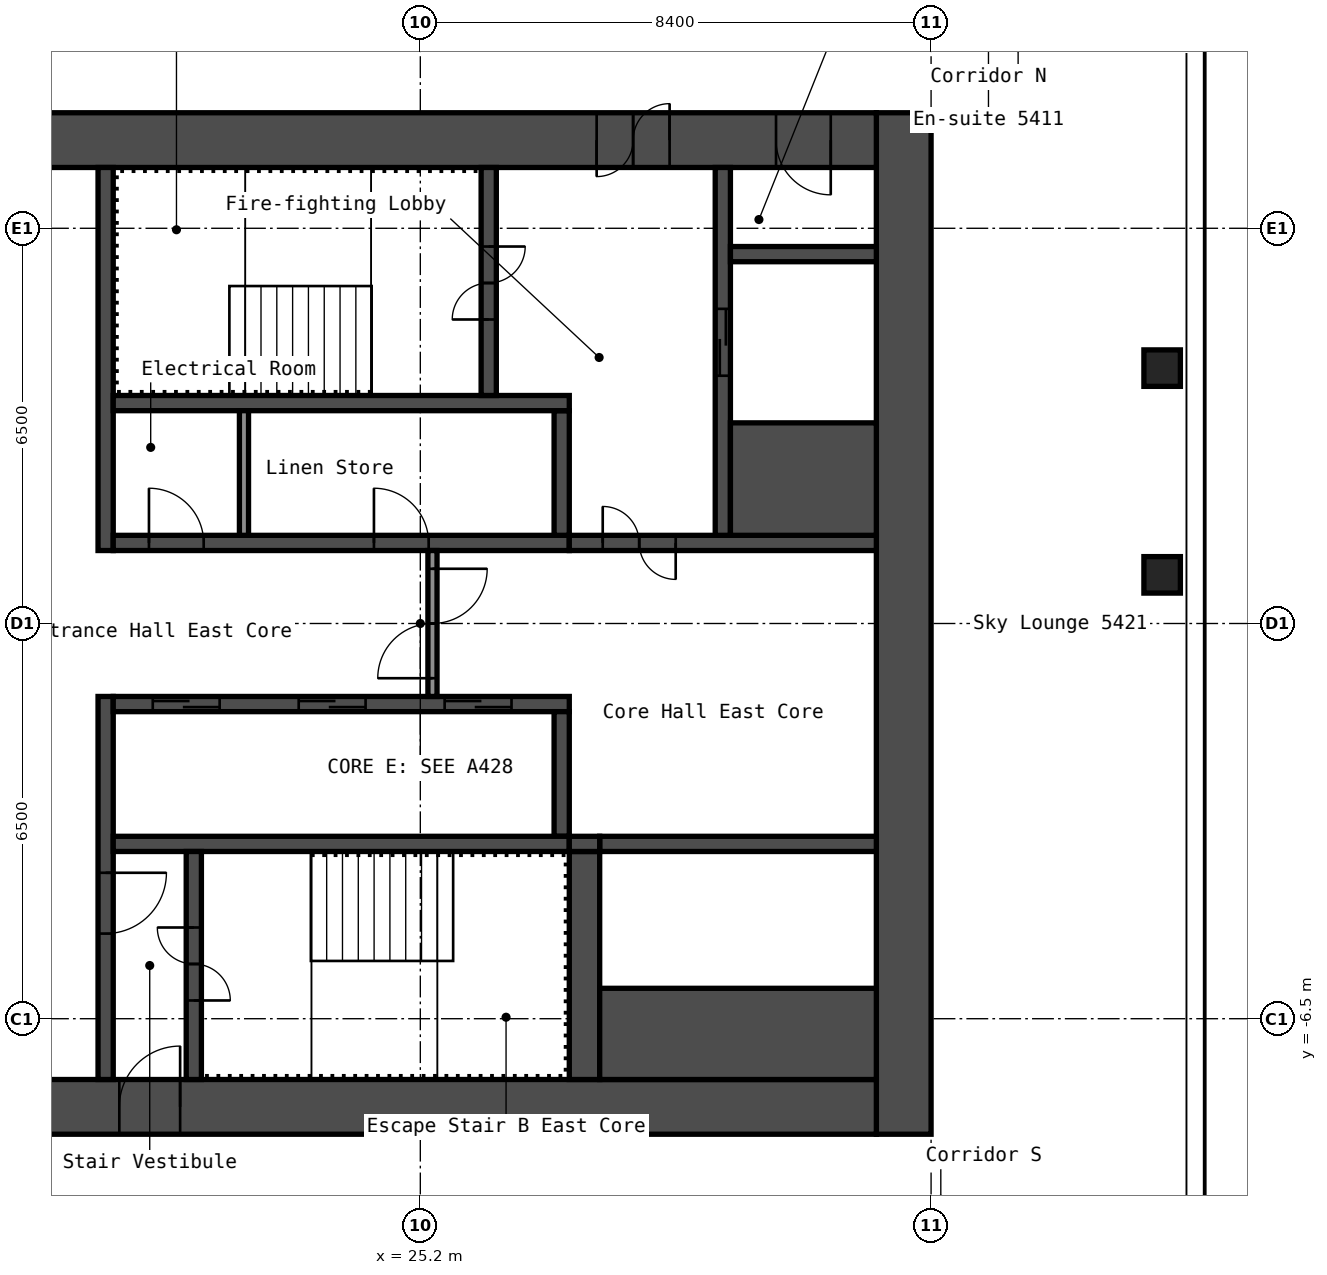
"""IFC4 building model, lengths in metres.
Left out: names, types, materials, properties, quantities, classifications, styles, units other than length and angle.
Written with IfcOpenShell. Run it as: python <this file> out.ifc"""

import sys

from ifc_helpers import new_model, si_unit, direction, frame, frame_2d, origin, origin_2d, place, context, subcontext, project, spatial, rectangle, hollow_rectangle, extrude, element, fill, save


model = new_model("IFC4")
c1 = context("Model", 3, precision=1e-05, world=origin(), true_north=direction((0.0, 1.0)))
c2 = subcontext(c1, "Body", "Model", "MODEL_VIEW")
j1 = project(units=[si_unit("LENGTHUNIT", "METRE"), si_unit("PLANEANGLEUNIT", "RADIAN")], contexts=[c1])
p1 = place(None, origin())
s1 = spatial("IfcSite", under=j1, at=p1, CompositionType="ELEMENT")
p2 = place(p1, origin())
s2 = spatial("IfcBuilding", under=s1, at=p2, CompositionType="ELEMENT")
p3 = place(p2, frame((0.0, 0.0, 193.0)))
s3 = spatial("IfcBuildingStorey", under=s2, at=p3, CompositionType="ELEMENT", Elevation=193.0)
for number, where, z_axis, x_axis in (
    (1, (37.4, 0.8, 0.0), (0.0, 0.0, 1.0), (1.0, 0.0, 0.0)),
    (2, (37.4, 4.2, 0.0), (0.0, 0.0, 1.0), (1.0, 0.0, 0.0)),
):
    element("IfcColumn", number, at=place(p3, frame(where, z_axis=z_axis, x_axis=x_axis)), inside=s3, PredefinedType="COLUMN", context=c2, shape_type="SweptSolid", body=[
        extrude(hollow_rectangle(XDim=0.6, YDim=0.6, WallThickness=0.025, InnerFilletRadius=0.038, OuterFilletRadius=0.062, at=origin_2d()), origin(), (0.0, 0.0, 1.0), 2.75),
    ])
p4 = place(p3, frame((33.15, -8.4, 0.0), z_axis=(0.0, 0.0, 1.0), x_axis=(0.0, 1.0, 0.0)))
e3 = element("IfcWall", 3, at=p4, inside=s3, PredefinedType="SHEAR", context=c2, shape_type="SweptSolid", body=[
    extrude(rectangle(XDim=16.8, YDim=0.9, at=frame_2d((8.4, 0.0))), origin(), (0.0, 0.0, 1.0), 2.75),
])
p5 = place(p3, frame((17.7, 7.95, 0.0), z_axis=(0.0, 0.0, 1.0), x_axis=(1.0, 0.0, 0.0)))
e4 = element("IfcWall", 4, at=p5, inside=s3, PredefinedType="SHEAR", context=c2, shape_type="SweptSolid", body=[
    extrude(rectangle(XDim=15.0, YDim=0.9, at=frame_2d((7.5, 0.0))), origin(), (0.0, 0.0, 1.0), 2.75),
])
p6 = place(p5, frame((10.4, 0.0, 0.0)))
e5 = element("IfcOpeningElement", 5, at=p6, cuts=e4, PredefinedType="OPENING", context=c2, shape_type="SweptSolid", body=[
    extrude(rectangle(XDim=1.2, YDim=2.1, at=frame_2d((0.6, 1.05))), frame((0.0, 0.46, 0.0), z_axis=(0.0, -1.0, 0.0), x_axis=(1.0, 0.0, 0.0)), (0.0, 0.0, 1.0), 0.92),
])
p7 = place(p5, frame((13.35, 0.0, 0.0)))
e6 = element("IfcOpeningElement", 6, at=p7, cuts=e4, PredefinedType="OPENING", context=c2, shape_type="SweptSolid", body=[
    extrude(rectangle(XDim=0.9, YDim=2.1, at=frame_2d((0.45, 1.05))), frame((0.0, 0.46, 0.0), z_axis=(0.0, -1.0, 0.0), x_axis=(1.0, 0.0, 0.0)), (0.0, 0.0, 1.0), 0.92),
])
p8 = place(p3, frame((17.7, -7.95, 0.0), z_axis=(0.0, 0.0, 1.0), x_axis=(1.0, 0.0, 0.0)))
e7 = element("IfcWall", 7, at=p8, inside=s3, PredefinedType="SHEAR", context=c2, shape_type="SweptSolid", body=[
    extrude(rectangle(XDim=15.0, YDim=0.9, at=frame_2d((7.5, 0.0))), origin(), (0.0, 0.0, 1.0), 2.75),
])
p9 = place(p8, frame((2.55, 0.0, 0.0)))
e8 = element("IfcOpeningElement", 8, at=p9, cuts=e7, PredefinedType="OPENING", context=c2, shape_type="SweptSolid", body=[
    extrude(rectangle(XDim=1.0, YDim=2.1, at=frame_2d((0.5, 1.05))), frame((0.0, 0.46, 0.0), z_axis=(0.0, -1.0, 0.0), x_axis=(1.0, 0.0, 0.0)), (0.0, 0.0, 1.0), 0.92),
])
p10 = place(p3, frame((20.025, 1.2, 0.0), z_axis=(0.0, 0.0, 1.0), x_axis=(0.0, 1.0, 0.0)))
e9 = element("IfcWall", 9, at=p10, inside=s3, PredefinedType="SHEAR", context=c2, shape_type="SweptSolid", body=[
    extrude(rectangle(XDim=6.3, YDim=0.25, at=frame_2d((3.15, 0.0))), origin(), (0.0, 0.0, 1.0), 2.75),
])
p11 = place(p3, frame((20.025, -7.5, 0.0), z_axis=(0.0, 0.0, 1.0), x_axis=(0.0, 1.0, 0.0)))
e10 = element("IfcWall", 10, at=p11, inside=s3, PredefinedType="SHEAR", context=c2, shape_type="SweptSolid", body=[
    extrude(rectangle(XDim=6.3, YDim=0.25, at=frame_2d((3.15, 0.0))), origin(), (0.0, 0.0, 1.0), 2.75),
])
p12 = place(p11, frame((2.4, 0.0, 0.0)))
e11 = element("IfcOpeningElement", 11, at=p12, cuts=e10, PredefinedType="OPENING", context=c2, shape_type="SweptSolid", body=[
    extrude(rectangle(XDim=1.0, YDim=2.1, at=frame_2d((0.5, 1.05))), frame((0.0, 0.135, 0.0), z_axis=(0.0, -1.0, 0.0), x_axis=(1.0, 0.0, 0.0)), (0.0, 0.0, 1.0), 0.27),
])
p13 = place(p3, frame((20.15, 1.325, 0.0), z_axis=(0.0, 0.0, 1.0), x_axis=(1.0, 0.0, 0.0)))
e12 = element("IfcWall", 12, at=p13, inside=s3, PredefinedType="SHEAR", context=c2, shape_type="SweptSolid", body=[
    extrude(rectangle(XDim=7.5, YDim=0.25, at=frame_2d((3.75, 0.0))), origin(), (0.0, 0.0, 1.0), 2.75),
])
p14 = place(p13, frame((0.587, 0.0, 0.0)))
e13 = element("IfcOpeningElement", 13, at=p14, cuts=e12, PredefinedType="OPENING", context=c2, shape_type="SweptSolid", body=[
    extrude(rectangle(XDim=0.9, YDim=2.1, at=frame_2d((0.45, 1.05))), frame((0.0, 0.135, 0.0), z_axis=(0.0, -1.0, 0.0), x_axis=(1.0, 0.0, 0.0)), (0.0, 0.0, 1.0), 0.27),
])
p15 = place(p13, frame((4.288, 0.0, 0.0)))
e14 = element("IfcOpeningElement", 14, at=p15, cuts=e12, PredefinedType="OPENING", context=c2, shape_type="SweptSolid", body=[
    extrude(rectangle(XDim=0.9, YDim=2.1, at=frame_2d((0.45, 1.05))), frame((0.0, 0.135, 0.0), z_axis=(0.0, -1.0, 0.0), x_axis=(1.0, 0.0, 0.0)), (0.0, 0.0, 1.0), 0.27),
])
p16 = place(p3, frame((27.525, 1.45, 0.0), z_axis=(0.0, 0.0, 1.0), x_axis=(0.0, 1.0, 0.0)))
e15 = element("IfcWall", 15, at=p16, inside=s3, PredefinedType="SHEAR", context=c2, shape_type="SweptSolid", body=[
    extrude(rectangle(XDim=2.05, YDim=0.25, at=frame_2d((1.025, 0.0))), origin(), (0.0, 0.0, 1.0), 2.75),
])
p17 = place(p3, frame((20.15, 3.625, 0.0), z_axis=(0.0, 0.0, 1.0), x_axis=(1.0, 0.0, 0.0)))
e16 = element("IfcWall", 16, at=p17, inside=s3, PredefinedType="SHEAR", context=c2, shape_type="SweptSolid", body=[
    extrude(rectangle(XDim=7.5, YDim=0.25, at=frame_2d((3.75, 0.0))), origin(), (0.0, 0.0, 1.0), 2.75),
])
p18 = place(p3, frame((26.325, 3.75, 0.0), z_axis=(0.0, 0.0, 1.0), x_axis=(0.0, 1.0, 0.0)))
e17 = element("IfcWall", 17, at=p18, inside=s3, PredefinedType="SHEAR", context=c2, shape_type="SweptSolid", body=[
    extrude(rectangle(XDim=3.75, YDim=0.25, at=frame_2d((1.875, 0.0))), origin(), (0.0, 0.0, 1.0), 2.75),
])
p19 = place(p18, frame((1.25, 0.0, 0.0)))
e18 = element("IfcOpeningElement", 18, at=p19, cuts=e17, PredefinedType="OPENING", context=c2, shape_type="SweptSolid", body=[
    extrude(rectangle(XDim=1.2, YDim=2.1, at=frame_2d((0.6, 1.05))), frame((0.0, 0.135, 0.0), z_axis=(0.0, -1.0, 0.0), x_axis=(1.0, 0.0, 0.0)), (0.0, 0.0, 1.0), 0.27),
])
p20 = place(p3, frame((27.65, 1.325, 0.0), z_axis=(0.0, 0.0, 1.0), x_axis=(1.0, 0.0, 0.0)))
e19 = element("IfcWall", 19, at=p20, inside=s3, PredefinedType="SHEAR", context=c2, shape_type="SweptSolid", body=[
    extrude(rectangle(XDim=5.05, YDim=0.25, at=frame_2d((2.525, 0.0))), origin(), (0.0, 0.0, 1.0), 2.75),
])
p21 = place(p20, frame((0.55, 0.0, 0.0)))
e20 = element("IfcOpeningElement", 20, at=p21, cuts=e19, PredefinedType="OPENING", context=c2, shape_type="SweptSolid", body=[
    extrude(rectangle(XDim=1.2, YDim=2.1, at=frame_2d((0.6, 1.05))), frame((0.0, 0.135, 0.0), z_axis=(0.0, -1.0, 0.0), x_axis=(1.0, 0.0, 0.0)), (0.0, 0.0, 1.0), 0.27),
])
p22 = place(p3, frame((30.175, 1.45, 0.0), z_axis=(0.0, 0.0, 1.0), x_axis=(0.0, 1.0, 0.0)))
e21 = element("IfcWall", 21, at=p22, inside=s3, PredefinedType="SHEAR", context=c2, shape_type="SweptSolid", body=[
    extrude(rectangle(XDim=6.05, YDim=0.25, at=frame_2d((3.025, 0.0))), origin(), (0.0, 0.0, 1.0), 2.75),
])
p23 = place(p22, frame((2.625, 0.0, 0.0)))
e22 = element("IfcOpeningElement", 22, at=p23, cuts=e21, PredefinedType="OPENING", context=c2, shape_type="SweptSolid", body=[
    extrude(rectangle(XDim=1.1, YDim=2.1, at=frame_2d((0.55, 1.05))), frame((0.0, 0.135, 0.0), z_axis=(0.0, -1.0, 0.0), x_axis=(1.0, 0.0, 0.0)), (0.0, 0.0, 1.0), 0.27),
])
p24 = place(p3, frame((30.3, 2.375, 0.0), z_axis=(0.0, 0.0, 1.0), x_axis=(1.0, 0.0, 0.0)))
e23 = element("IfcWall", 23, at=p24, inside=s3, PredefinedType="SHEAR", context=c2, shape_type="SweptSolid", body=[
    extrude(rectangle(XDim=2.4, YDim=1.85, at=frame_2d((1.2, 0.0))), origin(), (0.0, 0.0, 1.0), 2.75),
])
p25 = place(p3, frame((30.3, 6.075, 0.0), z_axis=(0.0, 0.0, 1.0), x_axis=(1.0, 0.0, 0.0)))
e24 = element("IfcWall", 24, at=p25, inside=s3, PredefinedType="SHEAR", context=c2, shape_type="SweptSolid", body=[
    extrude(rectangle(XDim=2.4, YDim=0.25, at=frame_2d((1.2, 0.0))), origin(), (0.0, 0.0, 1.0), 2.75),
])
p26 = place(p3, frame((20.15, -1.325, 0.0), z_axis=(0.0, 0.0, 1.0), x_axis=(1.0, 0.0, 0.0)))
e25 = element("IfcWall", 25, at=p26, inside=s3, PredefinedType="SHEAR", context=c2, shape_type="SweptSolid", body=[
    extrude(rectangle(XDim=7.5, YDim=0.25, at=frame_2d((3.75, 0.0))), origin(), (0.0, 0.0, 1.0), 2.75),
])
p27 = place(p26, frame((0.65, 0.0, 0.0)))
e26 = element("IfcOpeningElement", 26, at=p27, cuts=e25, PredefinedType="OPENING", context=c2, shape_type="SweptSolid", body=[
    extrude(rectangle(XDim=1.1, YDim=2.1, at=frame_2d((0.55, 1.05))), frame((0.0, 0.135, 0.0), z_axis=(0.0, -1.0, 0.0), x_axis=(1.0, 0.0, 0.0)), (0.0, 0.0, 1.0), 0.27),
])
p28 = place(p26, frame((3.05, 0.0, 0.0)))
e27 = element("IfcOpeningElement", 27, at=p28, cuts=e25, PredefinedType="OPENING", context=c2, shape_type="SweptSolid", body=[
    extrude(rectangle(XDim=1.1, YDim=2.1, at=frame_2d((0.55, 1.05))), frame((0.0, 0.135, 0.0), z_axis=(0.0, -1.0, 0.0), x_axis=(1.0, 0.0, 0.0)), (0.0, 0.0, 1.0), 0.27),
])
p29 = place(p26, frame((5.45, 0.0, 0.0)))
e28 = element("IfcOpeningElement", 28, at=p29, cuts=e25, PredefinedType="OPENING", context=c2, shape_type="SweptSolid", body=[
    extrude(rectangle(XDim=1.1, YDim=2.1, at=frame_2d((0.55, 1.05))), frame((0.0, 0.135, 0.0), z_axis=(0.0, -1.0, 0.0), x_axis=(1.0, 0.0, 0.0)), (0.0, 0.0, 1.0), 0.27),
])
p30 = place(p3, frame((27.525, -3.5, 0.0), z_axis=(0.0, 0.0, 1.0), x_axis=(0.0, 1.0, 0.0)))
e29 = element("IfcWall", 29, at=p30, inside=s3, PredefinedType="SHEAR", context=c2, shape_type="SweptSolid", body=[
    extrude(rectangle(XDim=2.05, YDim=0.25, at=frame_2d((1.025, 0.0))), origin(), (0.0, 0.0, 1.0), 2.75),
])
p31 = place(p3, frame((20.15, -3.625, 0.0), z_axis=(0.0, 0.0, 1.0), x_axis=(1.0, 0.0, 0.0)))
e30 = element("IfcWall", 30, at=p31, inside=s3, PredefinedType="SHEAR", context=c2, shape_type="SweptSolid", body=[
    extrude(rectangle(XDim=7.5, YDim=0.25, at=frame_2d((3.75, 0.0))), origin(), (0.0, 0.0, 1.0), 2.75),
])
p32 = place(p3, frame((21.475, -7.5, 0.0), z_axis=(0.0, 0.0, 1.0), x_axis=(0.0, 1.0, 0.0)))
e31 = element("IfcWall", 31, at=p32, inside=s3, PredefinedType="SHEAR", context=c2, shape_type="SweptSolid", body=[
    extrude(rectangle(XDim=3.75, YDim=0.25, at=frame_2d((1.875, 0.0))), origin(), (0.0, 0.0, 1.0), 2.75),
])
p33 = place(p32, frame((1.3, 0.0, 0.0)))
e32 = element("IfcOpeningElement", 32, at=p33, cuts=e31, PredefinedType="OPENING", context=c2, shape_type="SweptSolid", body=[
    extrude(rectangle(XDim=1.2, YDim=2.1, at=frame_2d((0.6, 1.05))), frame((0.0, 0.135, 0.0), z_axis=(0.0, -1.0, 0.0), x_axis=(1.0, 0.0, 0.0)), (0.0, 0.0, 1.0), 0.27),
])
p34 = place(p3, frame((27.9, -7.5, 0.0), z_axis=(0.0, 0.0, 1.0), x_axis=(0.0, 1.0, 0.0)))
e33 = element("IfcWall", 33, at=p34, inside=s3, PredefinedType="SHEAR", context=c2, shape_type="SweptSolid", body=[
    extrude(rectangle(XDim=3.75, YDim=0.5, at=frame_2d((1.875, 0.0))), origin(), (0.0, 0.0, 1.0), 2.75),
])
p35 = place(p3, frame((28.15, -3.625, 0.0), z_axis=(0.0, 0.0, 1.0), x_axis=(1.0, 0.0, 0.0)))
e34 = element("IfcWall", 34, at=p35, inside=s3, PredefinedType="SHEAR", context=c2, shape_type="SweptSolid", body=[
    extrude(rectangle(XDim=4.55, YDim=0.25, at=frame_2d((2.275, 0.0))), origin(), (0.0, 0.0, 1.0), 2.75),
])
p36 = place(p3, frame((28.15, -6.75, 0.0), z_axis=(0.0, 0.0, 1.0), x_axis=(1.0, 0.0, 0.0)))
e35 = element("IfcWall", 35, at=p36, inside=s3, PredefinedType="SHEAR", context=c2, shape_type="SweptSolid", body=[
    extrude(rectangle(XDim=4.55, YDim=1.5, at=frame_2d((2.275, 0.0))), origin(), (0.0, 0.0, 1.0), 2.75),
])
p37 = place(p3, frame((27.65, -3.625, 0.0), z_axis=(0.0, 0.0, 1.0), x_axis=(1.0, 0.0, 0.0)))
e36 = element("IfcWall", 36, at=p37, inside=s3, PredefinedType="SHEAR", context=c2, shape_type="SweptSolid", body=[
    extrude(rectangle(XDim=0.5, YDim=0.25, at=frame_2d((0.25, 0.0))), origin(), (0.0, 0.0, 1.0), 2.75),
])
p38 = place(p3, frame((25.4, -1.2, 0.0), z_axis=(0.0, 0.0, 1.0), x_axis=(0.0, 1.0, 0.0)))
e37 = element("IfcWall", 37, at=p38, inside=s3, PredefinedType="PARTITIONING", context=c2, shape_type="SweptSolid", body=[
    extrude(rectangle(XDim=2.4, YDim=0.15, at=frame_2d((1.2, 0.0))), origin(), (0.0, 0.0, 1.0), 2.75),
])
p39 = place(p38, frame((0.3, 0.0, 0.0)))
e38 = element("IfcOpeningElement", 38, at=p39, cuts=e37, PredefinedType="OPENING", context=c2, shape_type="SweptSolid", body=[
    extrude(rectangle(XDim=1.8, YDim=2.1, at=frame_2d((0.9, 1.05))), frame((0.0, 0.085, 0.0), z_axis=(0.0, -1.0, 0.0), x_axis=(1.0, 0.0, 0.0)), (0.0, 0.0, 1.0), 0.17),
])
p40 = place(p3, frame((22.3, 1.45, 0.0), z_axis=(0.0, 0.0, 1.0), x_axis=(0.0, 1.0, 0.0)))
e39 = element("IfcWall", 39, at=p40, inside=s3, PredefinedType="PARTITIONING", context=c2, shape_type="SweptSolid", body=[
    extrude(rectangle(XDim=2.05, YDim=0.15, at=frame_2d((1.025, 0.0))), origin(), (0.0, 0.0, 1.0), 2.75),
])
p41 = place(p6, origin())
e40 = element("IfcDoor", 40, at=p41, inside=s3, OperationType="DOUBLE_DOOR_SINGLE_SWING", PredefinedType="DOOR", context=c2, shape_type="SweptSolid", body=[
    extrude(rectangle(XDim=1.2, YDim=2.1, at=frame_2d((0.6, 1.05))), frame((0.0, 0.025, 0.0), z_axis=(0.0, -1.0, 0.0), x_axis=(1.0, 0.0, 0.0)), (0.0, 0.0, 1.0), 0.05),
])
fill(e5, e40)
p42 = place(p7, origin())
e41 = element("IfcDoor", 41, at=p42, inside=s3, OperationType="SINGLE_SWING_RIGHT", PredefinedType="DOOR", context=c2, shape_type="SweptSolid", body=[
    extrude(rectangle(XDim=0.9, YDim=2.1, at=frame_2d((0.45, 1.05))), frame((0.0, 0.025, 0.0), z_axis=(0.0, -1.0, 0.0), x_axis=(1.0, 0.0, 0.0)), (0.0, 0.0, 1.0), 0.05),
])
fill(e6, e41)
p43 = place(p9, origin())
e42 = element("IfcDoor", 42, at=p43, inside=s3, OperationType="SINGLE_SWING_LEFT", PredefinedType="DOOR", context=c2, shape_type="SweptSolid", body=[
    extrude(rectangle(XDim=1.0, YDim=2.1, at=frame_2d((0.5, 1.05))), frame((0.0, 0.025, 0.0), z_axis=(0.0, -1.0, 0.0), x_axis=(1.0, 0.0, 0.0)), (0.0, 0.0, 1.0), 0.05),
])
fill(e8, e42)
p44 = place(p19, origin())
e43 = element("IfcDoor", 43, at=p44, inside=s3, OperationType="DOUBLE_DOOR_SINGLE_SWING", PredefinedType="DOOR", context=c2, shape_type="SweptSolid", body=[
    extrude(rectangle(XDim=1.2, YDim=2.1, at=frame_2d((0.6, 1.05))), frame((0.0, 0.025, 0.0), z_axis=(0.0, -1.0, 0.0), x_axis=(1.0, 0.0, 0.0)), (0.0, 0.0, 1.0), 0.05),
])
fill(e18, e43)
p45 = place(p33, origin())
e44 = element("IfcDoor", 44, at=p45, inside=s3, OperationType="DOUBLE_DOOR_SINGLE_SWING", PredefinedType="DOOR", context=c2, shape_type="SweptSolid", body=[
    extrude(rectangle(XDim=1.2, YDim=2.1, at=frame_2d((0.6, 1.05))), frame((0.0, 0.025, 0.0), z_axis=(0.0, -1.0, 0.0), x_axis=(1.0, 0.0, 0.0)), (0.0, 0.0, 1.0), 0.05),
])
fill(e32, e44)
p46 = place(p12, origin())
e45 = element("IfcDoor", 45, at=p46, inside=s3, OperationType="SINGLE_SWING_RIGHT", PredefinedType="DOOR", context=c2, shape_type="SweptSolid", body=[
    extrude(rectangle(XDim=1.0, YDim=2.1, at=frame_2d((0.5, 1.05))), frame((0.0, 0.025, 0.0), z_axis=(0.0, -1.0, 0.0), x_axis=(1.0, 0.0, 0.0)), (0.0, 0.0, 1.0), 0.05),
])
fill(e11, e45)
p47 = place(p21, origin())
e46 = element("IfcDoor", 46, at=p47, inside=s3, OperationType="DOUBLE_DOOR_SINGLE_SWING", PredefinedType="DOOR", context=c2, shape_type="SweptSolid", body=[
    extrude(rectangle(XDim=1.2, YDim=2.1, at=frame_2d((0.6, 1.05))), frame((0.0, 0.025, 0.0), z_axis=(0.0, -1.0, 0.0), x_axis=(1.0, 0.0, 0.0)), (0.0, 0.0, 1.0), 0.05),
])
fill(e20, e46)
p48 = place(p39, origin())
e47 = element("IfcDoor", 47, at=p48, inside=s3, OperationType="DOUBLE_DOOR_SINGLE_SWING", PredefinedType="DOOR", context=c2, shape_type="SweptSolid", body=[
    extrude(rectangle(XDim=1.8, YDim=2.1, at=frame_2d((0.9, 1.05))), frame((0.0, 0.025, 0.0), z_axis=(0.0, -1.0, 0.0), x_axis=(1.0, 0.0, 0.0)), (0.0, 0.0, 1.0), 0.05),
])
fill(e38, e47)
p49 = place(p14, origin())
e48 = element("IfcDoor", 48, at=p49, inside=s3, OperationType="SINGLE_SWING_RIGHT", PredefinedType="DOOR", context=c2, shape_type="SweptSolid", body=[
    extrude(rectangle(XDim=0.9, YDim=2.1, at=frame_2d((0.45, 1.05))), frame((0.0, 0.025, 0.0), z_axis=(0.0, -1.0, 0.0), x_axis=(1.0, 0.0, 0.0)), (0.0, 0.0, 1.0), 0.05),
])
fill(e13, e48)
p50 = place(p15, origin())
e49 = element("IfcDoor", 49, at=p50, inside=s3, OperationType="SINGLE_SWING_RIGHT", PredefinedType="DOOR", context=c2, shape_type="SweptSolid", body=[
    extrude(rectangle(XDim=0.9, YDim=2.1, at=frame_2d((0.45, 1.05))), frame((0.0, 0.025, 0.0), z_axis=(0.0, -1.0, 0.0), x_axis=(1.0, 0.0, 0.0)), (0.0, 0.0, 1.0), 0.05),
])
fill(e14, e49)
p51 = place(p27, origin())
e50 = element("IfcDoor", 50, at=p51, inside=s3, OperationType="DOUBLE_DOOR_SLIDING", PredefinedType="DOOR", context=c2, shape_type="SweptSolid", body=[
    extrude(rectangle(XDim=1.1, YDim=2.1, at=frame_2d((0.55, 1.05))), frame((0.0, 0.025, 0.0), z_axis=(0.0, -1.0, 0.0), x_axis=(1.0, 0.0, 0.0)), (0.0, 0.0, 1.0), 0.05),
])
fill(e26, e50)
p52 = place(p28, origin())
e51 = element("IfcDoor", 51, at=p52, inside=s3, OperationType="DOUBLE_DOOR_SLIDING", PredefinedType="DOOR", context=c2, shape_type="SweptSolid", body=[
    extrude(rectangle(XDim=1.1, YDim=2.1, at=frame_2d((0.55, 1.05))), frame((0.0, 0.025, 0.0), z_axis=(0.0, -1.0, 0.0), x_axis=(1.0, 0.0, 0.0)), (0.0, 0.0, 1.0), 0.05),
])
fill(e27, e51)
p53 = place(p29, origin())
e52 = element("IfcDoor", 52, at=p53, inside=s3, OperationType="DOUBLE_DOOR_SLIDING", PredefinedType="DOOR", context=c2, shape_type="SweptSolid", body=[
    extrude(rectangle(XDim=1.1, YDim=2.1, at=frame_2d((0.55, 1.05))), frame((0.0, 0.025, 0.0), z_axis=(0.0, -1.0, 0.0), x_axis=(1.0, 0.0, 0.0)), (0.0, 0.0, 1.0), 0.05),
])
fill(e28, e52)
p54 = place(p23, origin())
e53 = element("IfcDoor", 53, at=p54, inside=s3, OperationType="DOUBLE_DOOR_SLIDING", PredefinedType="DOOR", context=c2, shape_type="SweptSolid", body=[
    extrude(rectangle(XDim=1.1, YDim=2.1, at=frame_2d((0.55, 1.05))), frame((0.0, 0.025, 0.0), z_axis=(0.0, -1.0, 0.0), x_axis=(1.0, 0.0, 0.0)), (0.0, 0.0, 1.0), 0.05),
])
fill(e22, e53)
save(model, sys.argv[1])
